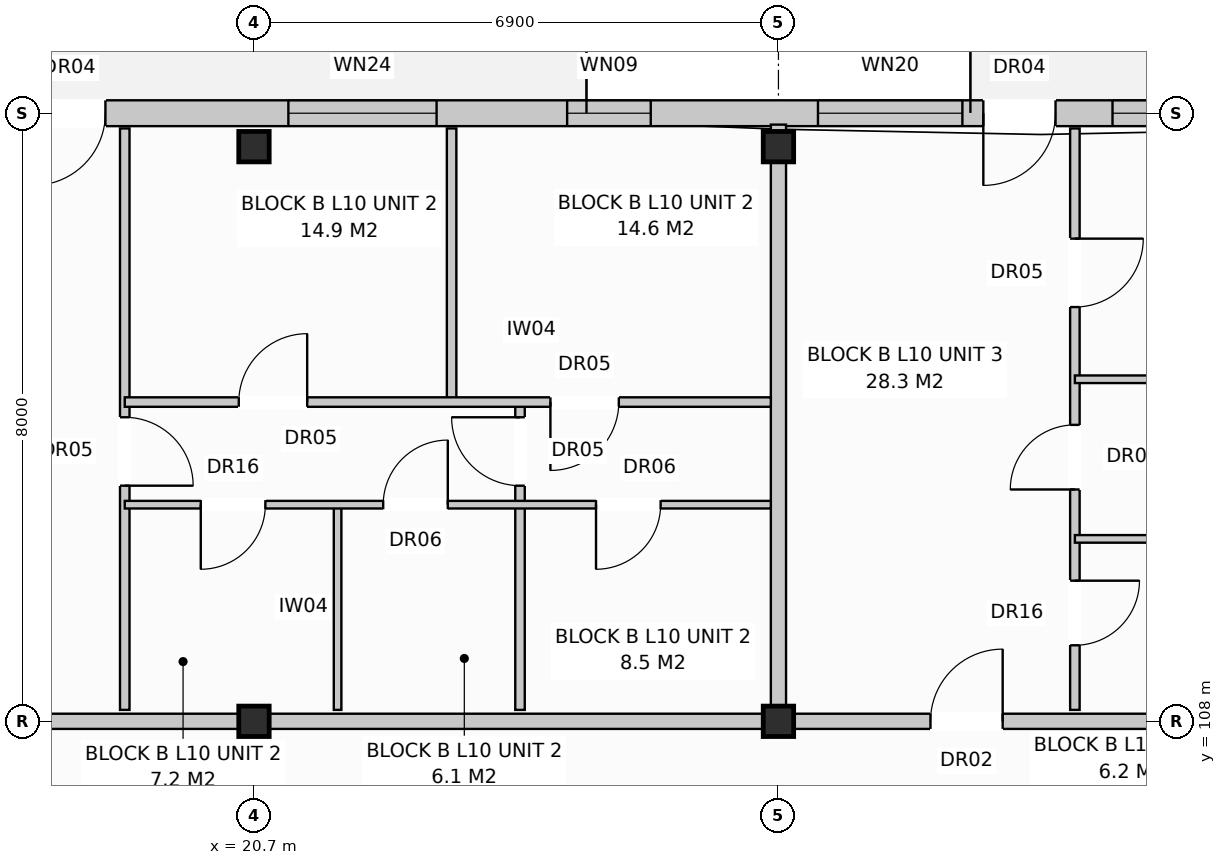
"""IFC4 building model, lengths in metres.
Left out: names, types, materials, properties, quantities, classifications, styles, units other than length and angle.
Written with IfcOpenShell. Run it as: python <this file> out.ifc"""

import sys

from ifc_helpers import new_model, si_unit, direction, frame, frame_2d, origin, origin_with_axes, origin_2d, place, context, subcontext, project, spatial, rectangle, extrude, element, fill, save


model = new_model("IFC4")
c1 = context("Model", 3, precision=1e-05, world=origin(), true_north=direction((0.0, 1.0)))
c2 = subcontext(c1, "Body", "Model", "MODEL_VIEW")
j1 = project(units=[si_unit("LENGTHUNIT", "METRE"), si_unit("PLANEANGLEUNIT", "RADIAN")], contexts=[c1])
p1 = place(None, origin())
s1 = spatial("IfcSite", under=j1, at=p1, CompositionType="ELEMENT")
p2 = place(p1, origin())
s2 = spatial("IfcBuilding", under=s1, at=p2, CompositionType="ELEMENT")
p3 = place(p2, frame((0.0, 0.0, 33.6)))
s3 = spatial("IfcBuildingStorey", under=s2, at=p3, CompositionType="ELEMENT", Elevation=33.6)
for number, where, z_axis, x_axis in (
    (1, (20.7, 108.0, 0.0), (0.0, 0.0, 1.0), (1.0, 0.0, 0.0)),
    (2, (20.7, 115.56, 0.0), (0.0, 0.0, 1.0), (1.0, 0.0, 0.0)),
    (3, (27.6, 108.0, 0.0), (0.0, 0.0, 1.0), (1.0, 0.0, 0.0)),
    (4, (27.6, 115.56, 0.0), (0.0, 0.0, 1.0), (1.0, 0.0, 0.0)),
):
    element("IfcColumn", number, at=place(p3, frame(where, z_axis=z_axis, x_axis=x_axis)), inside=s3, PredefinedType="COLUMN", context=c2, shape_type="SweptSolid", body=[
        extrude(rectangle(XDim=0.4, YDim=0.4, at=origin_2d()), origin(), (0.0, 0.0, 1.0), 3.2),
    ])
p4 = place(p3, frame((0.16, 116.0, 0.0), z_axis=(0.0, 0.0, 1.0), x_axis=(1.0, 0.0, 0.0)))
e5 = element("IfcWall", 5, at=p4, inside=s3, PredefinedType="STANDARD", context=c2, shape_type="SweptSolid", body=[
    extrude(rectangle(XDim=41.08, YDim=0.34, at=frame_2d((20.54, 0.0))), origin(), (0.0, 0.0, 1.0), 2.96),
])
p5 = place(p4, frame((2.835, 0.0, 0.0)))
e6 = element("IfcOpeningElement", 6, at=p5, cuts=e5, PredefinedType="OPENING", context=c2, shape_type="SweptSolid", body=[
    extrude(rectangle(XDim=0.95, YDim=2.1, at=frame_2d((0.475, 1.05))), frame((0.0, 0.182, 0.0), z_axis=(0.0, -1.0, 0.0), x_axis=(1.0, 0.0, 0.0)), (0.0, 0.0, 1.0), 0.364),
])
p6 = place(p4, frame((17.635, 0.0, 0.0)))
e7 = element("IfcOpeningElement", 7, at=p6, cuts=e5, PredefinedType="OPENING", context=c2, shape_type="SweptSolid", body=[
    extrude(rectangle(XDim=0.95, YDim=2.1, at=frame_2d((0.475, 1.05))), frame((0.0, 0.182, 0.0), z_axis=(0.0, -1.0, 0.0), x_axis=(1.0, 0.0, 0.0)), (0.0, 0.0, 1.0), 0.364),
])
p7 = place(p4, frame((30.135, 0.0, 0.0)))
e8 = element("IfcOpeningElement", 8, at=p7, cuts=e5, PredefinedType="OPENING", context=c2, shape_type="SweptSolid", body=[
    extrude(rectangle(XDim=0.95, YDim=2.1, at=frame_2d((0.475, 1.05))), frame((0.0, 0.182, 0.0), z_axis=(0.0, -1.0, 0.0), x_axis=(1.0, 0.0, 0.0)), (0.0, 0.0, 1.0), 0.364),
])
p8 = place(p4, frame((0.66, 0.0, 0.8)))
e9 = element("IfcOpeningElement", 9, at=p8, cuts=e5, PredefinedType="OPENING", context=c2, shape_type="SweptSolid", body=[
    extrude(rectangle(XDim=1.9, YDim=1.85, at=frame_2d((0.95, 0.925))), frame((0.0, 0.182, 0.0), z_axis=(0.0, -1.0, 0.0), x_axis=(1.0, 0.0, 0.0)), (0.0, 0.0, 1.0), 0.364),
])
p9 = place(p4, frame((4.335, 0.0, 0.8)))
e10 = element("IfcOpeningElement", 10, at=p9, cuts=e5, PredefinedType="OPENING", context=c2, shape_type="SweptSolid", body=[
    extrude(rectangle(XDim=1.95, YDim=1.65, at=frame_2d((0.975, 0.825))), frame((0.0, 0.182, 0.0), z_axis=(0.0, -1.0, 0.0), x_axis=(1.0, 0.0, 0.0)), (0.0, 0.0, 1.0), 0.364),
])
p10 = place(p4, frame((10.46, 0.0, 0.72)))
e11 = element("IfcOpeningElement", 11, at=p10, cuts=e5, PredefinedType="OPENING", context=c2, shape_type="SweptSolid", body=[
    extrude(rectangle(XDim=1.1, YDim=1.5, at=frame_2d((0.55, 0.75))), frame((0.0, 0.182, 0.0), z_axis=(0.0, -1.0, 0.0), x_axis=(1.0, 0.0, 0.0)), (0.0, 0.0, 1.0), 0.364),
])
p11 = place(p4, frame((15.76, 0.0, 0.72)))
e12 = element("IfcOpeningElement", 12, at=p11, cuts=e5, PredefinedType="OPENING", context=c2, shape_type="SweptSolid", body=[
    extrude(rectangle(XDim=1.1, YDim=1.5, at=frame_2d((0.55, 0.75))), frame((0.0, 0.182, 0.0), z_axis=(0.0, -1.0, 0.0), x_axis=(1.0, 0.0, 0.0)), (0.0, 0.0, 1.0), 0.364),
])
p12 = place(p4, frame((20.992, 0.0, 0.8)))
e13 = element("IfcOpeningElement", 13, at=p12, cuts=e5, PredefinedType="OPENING", context=c2, shape_type="SweptSolid", body=[
    extrude(rectangle(XDim=1.95, YDim=1.65, at=frame_2d((0.975, 0.825))), frame((0.0, 0.182, 0.0), z_axis=(0.0, -1.0, 0.0), x_axis=(1.0, 0.0, 0.0)), (0.0, 0.0, 1.0), 0.364),
])
p13 = place(p4, frame((24.66, 0.0, 0.72)))
e14 = element("IfcOpeningElement", 14, at=p13, cuts=e5, PredefinedType="OPENING", context=c2, shape_type="SweptSolid", body=[
    extrude(rectangle(XDim=1.1, YDim=1.5, at=frame_2d((0.55, 0.75))), frame((0.0, 0.182, 0.0), z_axis=(0.0, -1.0, 0.0), x_axis=(1.0, 0.0, 0.0)), (0.0, 0.0, 1.0), 0.364),
])
p14 = place(p4, frame((27.96, 0.0, 0.8)))
e15 = element("IfcOpeningElement", 15, at=p14, cuts=e5, PredefinedType="OPENING", context=c2, shape_type="SweptSolid", body=[
    extrude(rectangle(XDim=1.9, YDim=1.85, at=frame_2d((0.95, 0.925))), frame((0.0, 0.182, 0.0), z_axis=(0.0, -1.0, 0.0), x_axis=(1.0, 0.0, 0.0)), (0.0, 0.0, 1.0), 0.364),
])
p15 = place(p4, frame((31.835, 0.0, 0.8)))
e16 = element("IfcOpeningElement", 16, at=p15, cuts=e5, PredefinedType="OPENING", context=c2, shape_type="SweptSolid", body=[
    extrude(rectangle(XDim=1.95, YDim=1.65, at=frame_2d((0.975, 0.825))), frame((0.0, 0.182, 0.0), z_axis=(0.0, -1.0, 0.0), x_axis=(1.0, 0.0, 0.0)), (0.0, 0.0, 1.0), 0.364),
])
p16 = place(p4, frame((35.41, 0.0, 0.8)))
e17 = element("IfcOpeningElement", 17, at=p16, cuts=e5, PredefinedType="OPENING", context=c2, shape_type="SweptSolid", body=[
    extrude(rectangle(XDim=1.8, YDim=1.7, at=frame_2d((0.9, 0.85))), frame((0.0, 0.182, 0.0), z_axis=(0.0, -1.0, 0.0), x_axis=(1.0, 0.0, 0.0)), (0.0, 0.0, 1.0), 0.364),
])
p17 = place(p4, frame((38.575, 0.0, 0.8)))
e18 = element("IfcOpeningElement", 18, at=p17, cuts=e5, PredefinedType="OPENING", context=c2, shape_type="SweptSolid", body=[
    extrude(rectangle(XDim=1.9, YDim=1.85, at=frame_2d((0.95, 0.925))), frame((0.0, 0.182, 0.0), z_axis=(0.0, -1.0, 0.0), x_axis=(1.0, 0.0, 0.0)), (0.0, 0.0, 1.0), 0.364),
])
p18 = place(p3, frame((27.6, 108.15, 0.0), z_axis=(0.0, 0.0, 1.0), x_axis=(0.0, 1.0, 0.0)))
e19 = element("IfcWall", 19, at=p18, inside=s3, PredefinedType="PARTITIONING", context=c2, shape_type="SweptSolid", body=[
    extrude(rectangle(XDim=7.7, YDim=0.2, at=frame_2d((3.85, 0.0))), origin(), (0.0, 0.0, 1.0), 2.96),
])
p19 = place(p3, frame((13.8, 108.0, 0.0), z_axis=(0.0, 0.0, 1.0), x_axis=(1.0, 0.0, 0.0)))
e20 = element("IfcWall", 20, at=p19, inside=s3, PredefinedType="PARTITIONING", context=c2, shape_type="SweptSolid", body=[
    extrude(rectangle(XDim=13.8, YDim=0.2, at=frame_2d((6.9, 0.0))), origin(), (0.0, 0.0, 1.0), 2.4),
])
p20 = place(p19, frame((2.4, 0.0, 0.0)))
e21 = element("IfcOpeningElement", 21, at=p20, cuts=e20, PredefinedType="OPENING", context=c2, shape_type="SweptSolid", body=[
    extrude(rectangle(XDim=0.95, YDim=2.15, at=frame_2d((0.475, 1.075))), frame((0.0, 0.112, 0.0), z_axis=(0.0, -1.0, 0.0), x_axis=(1.0, 0.0, 0.0)), (0.0, 0.0, 1.0), 0.224),
])
p21 = place(p3, frame((19.0, 108.15, 0.0), z_axis=(0.0, 0.0, 1.0), x_axis=(0.0, 1.0, 0.0)))
e22 = element("IfcWall", 22, at=p21, inside=s3, PredefinedType="PARTITIONING", context=c2, shape_type="SweptSolid", body=[
    extrude(rectangle(XDim=7.65, YDim=0.125, at=frame_2d((3.825, 0.0))), origin(), (0.0, 0.0, 1.0), 2.96),
])
p22 = place(p21, frame((2.95, 0.0, 0.0)))
e23 = element("IfcOpeningElement", 23, at=p22, cuts=e22, PredefinedType="OPENING", context=c2, shape_type="SweptSolid", body=[
    extrude(rectangle(XDim=0.9, YDim=2.1, at=frame_2d((0.45, 1.05))), frame((0.0, 0.074, 0.0), z_axis=(0.0, -1.0, 0.0), x_axis=(1.0, 0.0, 0.0)), (0.0, 0.0, 1.0), 0.149),
])
p23 = place(p3, frame((21.8, 108.15, 0.0), z_axis=(0.0, 0.0, 1.0), x_axis=(0.0, 1.0, 0.0)))
e24 = element("IfcWall", 24, at=p23, inside=s3, PredefinedType="PARTITIONING", context=c2, shape_type="SweptSolid", body=[
    extrude(rectangle(XDim=2.7, YDim=0.1, at=frame_2d((1.35, 0.0))), origin(), (0.0, 0.0, 1.0), 2.96),
])
p24 = place(p3, frame((24.2, 108.15, 0.0), z_axis=(0.0, 0.0, 1.0), x_axis=(0.0, 1.0, 0.0)))
e25 = element("IfcWall", 25, at=p24, inside=s3, PredefinedType="PARTITIONING", context=c2, shape_type="SweptSolid", body=[
    extrude(rectangle(XDim=4.05, YDim=0.125, at=frame_2d((2.025, 0.0))), origin(), (0.0, 0.0, 1.0), 2.59),
])
p25 = place(p24, frame((2.95, 0.0, 0.0)))
e26 = element("IfcOpeningElement", 26, at=p25, cuts=e25, PredefinedType="OPENING", context=c2, shape_type="SweptSolid", body=[
    extrude(rectangle(XDim=0.9, YDim=2.1, at=frame_2d((0.45, 1.05))), frame((0.0, 0.074, 0.0), z_axis=(0.0, -1.0, 0.0), x_axis=(1.0, 0.0, 0.0)), (0.0, 0.0, 1.0), 0.149),
])
p26 = place(p3, frame((23.3, 112.2, 0.0), z_axis=(0.0, 0.0, 1.0), x_axis=(0.0, 1.0, 0.0)))
e27 = element("IfcWall", 27, at=p26, inside=s3, PredefinedType="PARTITIONING", context=c2, shape_type="SweptSolid", body=[
    extrude(rectangle(XDim=3.6, YDim=0.125, at=frame_2d((1.8, 0.0))), origin(), (0.0, 0.0, 1.0), 2.96),
])
p27 = place(p3, frame((19.0, 110.85, 0.0), z_axis=(0.0, 0.0, 1.0), x_axis=(1.0, 0.0, 0.0)))
e28 = element("IfcWall", 28, at=p27, inside=s3, PredefinedType="PARTITIONING", context=c2, shape_type="SweptSolid", body=[
    extrude(rectangle(XDim=8.5, YDim=0.1, at=frame_2d((4.25, 0.0))), origin(), (0.0, 0.0, 1.0), 2.96),
])
p28 = place(p27, frame((1.0, 0.0, 0.0)))
e29 = element("IfcOpeningElement", 29, at=p28, cuts=e28, PredefinedType="OPENING", context=c2, shape_type="SweptSolid", body=[
    extrude(rectangle(XDim=0.85, YDim=2.1, at=frame_2d((0.425, 1.05))), frame((0.0, 0.062, 0.0), z_axis=(0.0, -1.0, 0.0), x_axis=(1.0, 0.0, 0.0)), (0.0, 0.0, 1.0), 0.124),
])
p29 = place(p27, frame((3.4, 0.0, 0.0)))
e30 = element("IfcOpeningElement", 30, at=p29, cuts=e28, PredefinedType="OPENING", context=c2, shape_type="SweptSolid", body=[
    extrude(rectangle(XDim=0.85, YDim=2.05, at=frame_2d((0.425, 1.025))), frame((0.0, 0.062, 0.0), z_axis=(0.0, -1.0, 0.0), x_axis=(1.0, 0.0, 0.0)), (0.0, 0.0, 1.0), 0.124),
])
p30 = place(p27, frame((6.2, 0.0, 0.0)))
e31 = element("IfcOpeningElement", 31, at=p30, cuts=e28, PredefinedType="OPENING", context=c2, shape_type="SweptSolid", body=[
    extrude(rectangle(XDim=0.85, YDim=2.05, at=frame_2d((0.425, 1.025))), frame((0.0, 0.062, 0.0), z_axis=(0.0, -1.0, 0.0), x_axis=(1.0, 0.0, 0.0)), (0.0, 0.0, 1.0), 0.124),
])
p31 = place(p3, frame((19.0, 112.2, 0.0), z_axis=(0.0, 0.0, 1.0), x_axis=(1.0, 0.0, 0.0)))
e32 = element("IfcWall", 32, at=p31, inside=s3, PredefinedType="PARTITIONING", context=c2, shape_type="SweptSolid", body=[
    extrude(rectangle(XDim=8.5, YDim=0.125, at=frame_2d((4.25, 0.0))), origin(), (0.0, 0.0, 1.0), 2.96),
])
p32 = place(p31, frame((1.5, 0.0, 0.0)))
e33 = element("IfcOpeningElement", 33, at=p32, cuts=e32, PredefinedType="OPENING", context=c2, shape_type="SweptSolid", body=[
    extrude(rectangle(XDim=0.9, YDim=2.1, at=frame_2d((0.45, 1.05))), frame((0.0, 0.074, 0.0), z_axis=(0.0, -1.0, 0.0), x_axis=(1.0, 0.0, 0.0)), (0.0, 0.0, 1.0), 0.149),
])
p33 = place(p31, frame((5.6, 0.0, 0.0)))
e34 = element("IfcOpeningElement", 34, at=p33, cuts=e32, PredefinedType="OPENING", context=c2, shape_type="SweptSolid", body=[
    extrude(rectangle(XDim=0.9, YDim=2.1, at=frame_2d((0.45, 1.05))), frame((0.0, 0.074, 0.0), z_axis=(0.0, -1.0, 0.0), x_axis=(1.0, 0.0, 0.0)), (0.0, 0.0, 1.0), 0.149),
])
p34 = place(p3, frame((27.6, 108.0, 0.0), z_axis=(0.0, 0.0, 1.0), x_axis=(1.0, 0.0, 0.0)))
e35 = element("IfcWall", 35, at=p34, inside=s3, PredefinedType="PARTITIONING", context=c2, shape_type="SweptSolid", body=[
    extrude(rectangle(XDim=6.9, YDim=0.2, at=frame_2d((3.45, 0.0))), origin(), (0.0, 0.0, 1.0), 2.4),
])
p35 = place(p34, frame((2.0, 0.0, 0.0)))
e36 = element("IfcOpeningElement", 36, at=p35, cuts=e35, PredefinedType="OPENING", context=c2, shape_type="SweptSolid", body=[
    extrude(rectangle(XDim=0.95, YDim=2.15, at=frame_2d((0.475, 1.075))), frame((0.0, 0.112, 0.0), z_axis=(0.0, -1.0, 0.0), x_axis=(1.0, 0.0, 0.0)), (0.0, 0.0, 1.0), 0.224),
])
p36 = place(p3, frame((31.5, 108.15, 0.0), z_axis=(0.0, 0.0, 1.0), x_axis=(0.0, 1.0, 0.0)))
e37 = element("IfcWall", 37, at=p36, inside=s3, PredefinedType="PARTITIONING", context=c2, shape_type="SweptSolid", body=[
    extrude(rectangle(XDim=7.65, YDim=0.125, at=frame_2d((3.825, 0.0))), origin(), (0.0, 0.0, 1.0), 2.96),
])
p37 = place(p36, frame((0.85, 0.0, 0.0)))
e38 = element("IfcOpeningElement", 38, at=p37, cuts=e37, PredefinedType="OPENING", context=c2, shape_type="SweptSolid", body=[
    extrude(rectangle(XDim=0.85, YDim=2.1, at=frame_2d((0.425, 1.05))), frame((0.0, 0.074, 0.0), z_axis=(0.0, -1.0, 0.0), x_axis=(1.0, 0.0, 0.0)), (0.0, 0.0, 1.0), 0.149),
])
p38 = place(p36, frame((2.9, 0.0, 0.0)))
e39 = element("IfcOpeningElement", 39, at=p38, cuts=e37, PredefinedType="OPENING", context=c2, shape_type="SweptSolid", body=[
    extrude(rectangle(XDim=0.85, YDim=2.05, at=frame_2d((0.425, 1.025))), frame((0.0, 0.074, 0.0), z_axis=(0.0, -1.0, 0.0), x_axis=(1.0, 0.0, 0.0)), (0.0, 0.0, 1.0), 0.149),
])
p39 = place(p36, frame((5.3, 0.0, 0.0)))
e40 = element("IfcOpeningElement", 40, at=p39, cuts=e37, PredefinedType="OPENING", context=c2, shape_type="SweptSolid", body=[
    extrude(rectangle(XDim=0.9, YDim=2.1, at=frame_2d((0.45, 1.05))), frame((0.0, 0.074, 0.0), z_axis=(0.0, -1.0, 0.0), x_axis=(1.0, 0.0, 0.0)), (0.0, 0.0, 1.0), 0.149),
])
for number, where, z_axis, x_axis in (
    (41, (31.5, 110.4, 0.0), (0.0, 0.0, 1.0), (1.0, 0.0, 0.0)),
    (42, (31.5, 112.5, 0.0), (0.0, 0.0, 1.0), (1.0, 0.0, 0.0)),
):
    element("IfcWall", number, at=place(p3, frame(where, z_axis=z_axis, x_axis=x_axis)), inside=s3, PredefinedType="PARTITIONING", context=c2, shape_type="SweptSolid", body=[
        extrude(rectangle(XDim=2.9, YDim=0.1, at=frame_2d((1.45, 0.0))), origin(), (0.0, 0.0, 1.0), 2.96),
    ])
p40 = place(p6, frame((0.95, 0.0, 0.0), z_axis=(0.0, 0.0, 1.0), x_axis=(-1.0, 0.0, 0.0)))
e43 = element("IfcDoor", 43, at=p40, inside=s3, OperationType="SINGLE_SWING_LEFT", PredefinedType="DOOR", context=c2, shape_type="SweptSolid", body=[
    extrude(rectangle(XDim=0.95, YDim=2.1, at=frame_2d((0.475, 1.05))), frame((0.0, 0.025, 0.0), z_axis=(0.0, -1.0, 0.0), x_axis=(1.0, 0.0, 0.0)), (0.0, 0.0, 1.0), 0.05),
])
fill(e7, e43)
p41 = place(p7, frame((0.95, 0.0, 0.0), z_axis=(0.0, 0.0, 1.0), x_axis=(-1.0, 0.0, 0.0)))
e44 = element("IfcDoor", 44, at=p41, inside=s3, OperationType="SINGLE_SWING_LEFT", PredefinedType="DOOR", context=c2, shape_type="SweptSolid", body=[
    extrude(rectangle(XDim=0.95, YDim=2.1, at=frame_2d((0.475, 1.05))), frame((0.0, 0.025, 0.0), z_axis=(0.0, -1.0, 0.0), x_axis=(1.0, 0.0, 0.0)), (0.0, 0.0, 1.0), 0.05),
])
fill(e8, e44)
p42 = place(p12, origin_with_axes())
e45 = element("IfcWindow", 45, at=p42, inside=s3, PartitioningType="SINGLE_PANEL", PredefinedType="WINDOW", context=c2, shape_type="SweptSolid", body=[
    extrude(rectangle(XDim=1.95, YDim=1.65, at=frame_2d((0.975, 0.825))), frame((0.0, 0.03, 0.0), z_axis=(0.0, -1.0, 0.0), x_axis=(1.0, 0.0, 0.0)), (0.0, 0.0, 1.0), 0.06),
])
fill(e13, e45)
p43 = place(p13, origin_with_axes())
e46 = element("IfcWindow", 46, at=p43, inside=s3, PartitioningType="SINGLE_PANEL", PredefinedType="WINDOW", context=c2, shape_type="SweptSolid", body=[
    extrude(rectangle(XDim=1.1, YDim=1.5, at=frame_2d((0.55, 0.75))), frame((0.0, 0.03, 0.0), z_axis=(0.0, -1.0, 0.0), x_axis=(1.0, 0.0, 0.0)), (0.0, 0.0, 1.0), 0.06),
])
fill(e14, e46)
p44 = place(p14, origin_with_axes())
e47 = element("IfcWindow", 47, at=p44, inside=s3, PartitioningType="SINGLE_PANEL", PredefinedType="WINDOW", context=c2, shape_type="SweptSolid", body=[
    extrude(rectangle(XDim=1.9, YDim=1.85, at=frame_2d((0.95, 0.925))), frame((0.0, 0.03, 0.0), z_axis=(0.0, -1.0, 0.0), x_axis=(1.0, 0.0, 0.0)), (0.0, 0.0, 1.0), 0.06),
])
fill(e15, e47)
p45 = place(p15, origin_with_axes())
e48 = element("IfcWindow", 48, at=p45, inside=s3, PartitioningType="SINGLE_PANEL", PredefinedType="WINDOW", context=c2, shape_type="SweptSolid", body=[
    extrude(rectangle(XDim=1.95, YDim=1.65, at=frame_2d((0.975, 0.825))), frame((0.0, 0.03, 0.0), z_axis=(0.0, -1.0, 0.0), x_axis=(1.0, 0.0, 0.0)), (0.0, 0.0, 1.0), 0.06),
])
fill(e16, e48)
p46 = place(p22, frame((0.9, 0.0, 0.0), z_axis=(0.0, 0.0, 1.0), x_axis=(-1.0, 0.0, 0.0)))
e49 = element("IfcDoor", 49, at=p46, inside=s3, OperationType="SINGLE_SWING_LEFT", PredefinedType="DOOR", context=c2, shape_type="SweptSolid", body=[
    extrude(rectangle(XDim=0.9, YDim=2.1, at=frame_2d((0.45, 1.05))), frame((0.0, 0.025, 0.0), z_axis=(0.0, -1.0, 0.0), x_axis=(1.0, 0.0, 0.0)), (0.0, 0.0, 1.0), 0.05),
])
fill(e23, e49)
p47 = place(p25, origin_with_axes())
e50 = element("IfcDoor", 50, at=p47, inside=s3, OperationType="SINGLE_SWING_RIGHT", PredefinedType="DOOR", context=c2, shape_type="SweptSolid", body=[
    extrude(rectangle(XDim=0.9, YDim=2.1, at=frame_2d((0.45, 1.05))), frame((0.0, 0.025, 0.0), z_axis=(0.0, -1.0, 0.0), x_axis=(1.0, 0.0, 0.0)), (0.0, 0.0, 1.0), 0.05),
])
fill(e26, e50)
p48 = place(p28, frame((0.85, 0.0, 0.0), z_axis=(0.0, 0.0, 1.0), x_axis=(-1.0, 0.0, 0.0)))
e51 = element("IfcDoor", 51, at=p48, inside=s3, OperationType="SINGLE_SWING_LEFT", PredefinedType="DOOR", context=c2, shape_type="SweptSolid", body=[
    extrude(rectangle(XDim=0.85, YDim=2.1, at=frame_2d((0.425, 1.05))), frame((0.0, 0.025, 0.0), z_axis=(0.0, -1.0, 0.0), x_axis=(1.0, 0.0, 0.0)), (0.0, 0.0, 1.0), 0.05),
])
fill(e29, e51)
p49 = place(p29, origin_with_axes())
e52 = element("IfcDoor", 52, at=p49, inside=s3, OperationType="SINGLE_SWING_RIGHT", PredefinedType="DOOR", context=c2, shape_type="SweptSolid", body=[
    extrude(rectangle(XDim=0.85, YDim=2.05, at=frame_2d((0.425, 1.025))), frame((0.0, 0.025, 0.0), z_axis=(0.0, -1.0, 0.0), x_axis=(1.0, 0.0, 0.0)), (0.0, 0.0, 1.0), 0.05),
])
fill(e30, e52)
p50 = place(p30, frame((0.85, 0.0, 0.0), z_axis=(0.0, 0.0, 1.0), x_axis=(-1.0, 0.0, 0.0)))
e53 = element("IfcDoor", 53, at=p50, inside=s3, OperationType="SINGLE_SWING_LEFT", PredefinedType="DOOR", context=c2, shape_type="SweptSolid", body=[
    extrude(rectangle(XDim=0.85, YDim=2.05, at=frame_2d((0.425, 1.025))), frame((0.0, 0.025, 0.0), z_axis=(0.0, -1.0, 0.0), x_axis=(1.0, 0.0, 0.0)), (0.0, 0.0, 1.0), 0.05),
])
fill(e31, e53)
p51 = place(p32, origin_with_axes())
e54 = element("IfcDoor", 54, at=p51, inside=s3, OperationType="SINGLE_SWING_RIGHT", PredefinedType="DOOR", context=c2, shape_type="SweptSolid", body=[
    extrude(rectangle(XDim=0.9, YDim=2.1, at=frame_2d((0.45, 1.05))), frame((0.0, 0.025, 0.0), z_axis=(0.0, -1.0, 0.0), x_axis=(1.0, 0.0, 0.0)), (0.0, 0.0, 1.0), 0.05),
])
fill(e33, e54)
p52 = place(p33, frame((0.9, 0.0, 0.0), z_axis=(0.0, 0.0, 1.0), x_axis=(-1.0, 0.0, 0.0)))
e55 = element("IfcDoor", 55, at=p52, inside=s3, OperationType="SINGLE_SWING_LEFT", PredefinedType="DOOR", context=c2, shape_type="SweptSolid", body=[
    extrude(rectangle(XDim=0.9, YDim=2.1, at=frame_2d((0.45, 1.05))), frame((0.0, 0.025, 0.0), z_axis=(0.0, -1.0, 0.0), x_axis=(1.0, 0.0, 0.0)), (0.0, 0.0, 1.0), 0.05),
])
fill(e34, e55)
p53 = place(p35, origin_with_axes())
e56 = element("IfcDoor", 56, at=p53, inside=s3, OperationType="SINGLE_SWING_RIGHT", PredefinedType="DOOR", context=c2, shape_type="SweptSolid", body=[
    extrude(rectangle(XDim=0.95, YDim=2.15, at=frame_2d((0.475, 1.075))), frame((0.0, 0.025, 0.0), z_axis=(0.0, -1.0, 0.0), x_axis=(1.0, 0.0, 0.0)), (0.0, 0.0, 1.0), 0.05),
])
fill(e36, e56)
p54 = place(p37, frame((0.85, 0.0, 0.0), z_axis=(0.0, 0.0, 1.0), x_axis=(-1.0, 0.0, 0.0)))
e57 = element("IfcDoor", 57, at=p54, inside=s3, OperationType="SINGLE_SWING_RIGHT", PredefinedType="DOOR", context=c2, shape_type="SweptSolid", body=[
    extrude(rectangle(XDim=0.85, YDim=2.1, at=frame_2d((0.425, 1.05))), frame((0.0, 0.025, 0.0), z_axis=(0.0, -1.0, 0.0), x_axis=(1.0, 0.0, 0.0)), (0.0, 0.0, 1.0), 0.05),
])
fill(e38, e57)
p55 = place(p38, origin_with_axes())
e58 = element("IfcDoor", 58, at=p55, inside=s3, OperationType="SINGLE_SWING_LEFT", PredefinedType="DOOR", context=c2, shape_type="SweptSolid", body=[
    extrude(rectangle(XDim=0.85, YDim=2.05, at=frame_2d((0.425, 1.025))), frame((0.0, 0.025, 0.0), z_axis=(0.0, -1.0, 0.0), x_axis=(1.0, 0.0, 0.0)), (0.0, 0.0, 1.0), 0.05),
])
fill(e39, e58)
p56 = place(p39, frame((0.9, 0.0, 0.0), z_axis=(0.0, 0.0, 1.0), x_axis=(-1.0, 0.0, 0.0)))
e59 = element("IfcDoor", 59, at=p56, inside=s3, OperationType="SINGLE_SWING_RIGHT", PredefinedType="DOOR", context=c2, shape_type="SweptSolid", body=[
    extrude(rectangle(XDim=0.9, YDim=2.1, at=frame_2d((0.45, 1.05))), frame((0.0, 0.025, 0.0), z_axis=(0.0, -1.0, 0.0), x_axis=(1.0, 0.0, 0.0)), (0.0, 0.0, 1.0), 0.05),
])
fill(e40, e59)
save(model, sys.argv[1])
